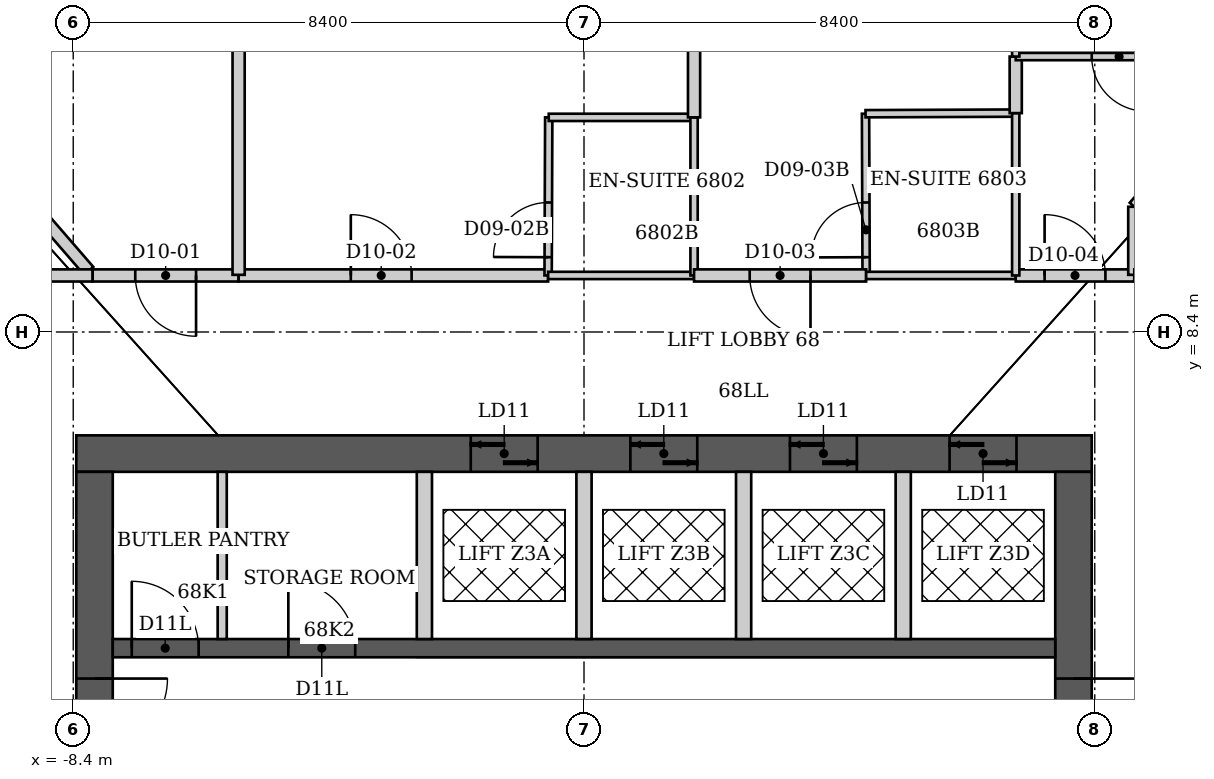
"""IFC4 building model, lengths in metres.
Left out: names, types, materials, properties, quantities, classifications, styles, units other than length and angle.
Written with IfcOpenShell. Run it as: python <this file> out.ifc"""

import sys

from ifc_helpers import new_model, si_unit, direction, frame, frame_2d, origin, place, context, subcontext, project, spatial, rectangle, extrude, element, fill, save


model = new_model("IFC4")
c1 = context("Model", 3, precision=1e-05, world=origin(), true_north=direction((0.0, 1.0)))
c2 = subcontext(c1, "Body", "Model", "MODEL_VIEW")
j1 = project(units=[si_unit("LENGTHUNIT", "METRE"), si_unit("PLANEANGLEUNIT", "RADIAN")], contexts=[c1])
p1 = place(None, origin())
s1 = spatial("IfcSite", under=j1, at=p1, CompositionType="ELEMENT")
p2 = place(p1, origin())
s2 = spatial("IfcBuilding", under=s1, at=p2, CompositionType="ELEMENT")
p3 = place(p2, frame((0.0, 0.0, 272.2)))
s3 = spatial("IfcBuildingStorey", under=s2, at=p3, CompositionType="ELEMENT", Elevation=272.2)
p4 = place(p3, frame((-8.35, 6.4, 0.0), z_axis=(0.0, 0.0, 1.0), x_axis=(1.0, 0.0, 0.0)))
e1 = element("IfcWall", 1, at=p4, inside=s3, PredefinedType="SHEAR", context=c2, shape_type="SweptSolid", body=[
    extrude(rectangle(XDim=16.7, YDim=0.6, at=frame_2d((8.35, 0.0))), origin(), (0.0, 0.0, 1.0), 3.8),
])
p5 = place(p4, frame((6.488, 0.0, 0.0)))
e2 = element("IfcOpeningElement", 2, at=p5, cuts=e1, PredefinedType="OPENING", context=c2, shape_type="SweptSolid", body=[
    extrude(rectangle(XDim=1.1, YDim=2.1, at=frame_2d((0.55, 1.05))), frame((0.0, 0.3, 0.0), z_axis=(0.0, -1.0, 0.0), x_axis=(1.0, 0.0, 0.0)), (0.0, 0.0, 1.0), 0.6),
])
p6 = place(p4, frame((9.113, 0.0, 0.0)))
e3 = element("IfcOpeningElement", 3, at=p6, cuts=e1, PredefinedType="OPENING", context=c2, shape_type="SweptSolid", body=[
    extrude(rectangle(XDim=1.1, YDim=2.1, at=frame_2d((0.55, 1.05))), frame((0.0, 0.3, 0.0), z_axis=(0.0, -1.0, 0.0), x_axis=(1.0, 0.0, 0.0)), (0.0, 0.0, 1.0), 0.6),
])
p7 = place(p4, frame((11.738, 0.0, 0.0)))
e4 = element("IfcOpeningElement", 4, at=p7, cuts=e1, PredefinedType="OPENING", context=c2, shape_type="SweptSolid", body=[
    extrude(rectangle(XDim=1.1, YDim=2.1, at=frame_2d((0.55, 1.05))), frame((0.0, 0.3, 0.0), z_axis=(0.0, -1.0, 0.0), x_axis=(1.0, 0.0, 0.0)), (0.0, 0.0, 1.0), 0.6),
])
p8 = place(p4, frame((14.363, 0.0, 0.0)))
e5 = element("IfcOpeningElement", 5, at=p8, cuts=e1, PredefinedType="OPENING", context=c2, shape_type="SweptSolid", body=[
    extrude(rectangle(XDim=1.1, YDim=2.1, at=frame_2d((0.55, 1.05))), frame((0.0, 0.3, 0.0), z_axis=(0.0, -1.0, 0.0), x_axis=(1.0, 0.0, 0.0)), (0.0, 0.0, 1.0), 0.6),
])
p9 = place(p3, frame((-8.05, -6.1, 0.0), z_axis=(0.0, 0.0, 1.0), x_axis=(0.0, 1.0, 0.0)))
e6 = element("IfcWall", 6, at=p9, inside=s3, PredefinedType="SHEAR", context=c2, shape_type="SweptSolid", body=[
    extrude(rectangle(XDim=12.2, YDim=0.6, at=frame_2d((6.1, 0.0))), origin(), (0.0, 0.0, 1.0), 3.8),
])
p10 = place(p9, frame((7.6, 0.0, 0.0)))
e7 = element("IfcOpeningElement", 7, at=p10, cuts=e6, PredefinedType="OPENING", context=c2, shape_type="SweptSolid", body=[
    extrude(rectangle(XDim=1.2, YDim=2.2, at=frame_2d((0.6, 1.1))), frame((0.0, 0.3, 0.0), z_axis=(0.0, -1.0, 0.0), x_axis=(1.0, 0.0, 0.0)), (0.0, 0.0, 1.0), 0.6),
])
p11 = place(p3, frame((8.05, -6.1, 0.0), z_axis=(0.0, 0.0, 1.0), x_axis=(0.0, 1.0, 0.0)))
e8 = element("IfcWall", 8, at=p11, inside=s3, PredefinedType="SHEAR", context=c2, shape_type="SweptSolid", body=[
    extrude(rectangle(XDim=12.2, YDim=0.6, at=frame_2d((6.1, 0.0))), origin(), (0.0, 0.0, 1.0), 3.8),
])
p12 = place(p11, frame((7.6, 0.0, 0.0)))
e9 = element("IfcOpeningElement", 9, at=p12, cuts=e8, PredefinedType="OPENING", context=c2, shape_type="SweptSolid", body=[
    extrude(rectangle(XDim=1.2, YDim=2.2, at=frame_2d((0.6, 1.1))), frame((0.0, 0.3, 0.0), z_axis=(0.0, -1.0, 0.0), x_axis=(1.0, 0.0, 0.0)), (0.0, 0.0, 1.0), 0.6),
])
p13 = place(p3, frame((-7.75, 3.2, 0.0), z_axis=(0.0, 0.0, 1.0), x_axis=(1.0, 0.0, 0.0)))
e10 = element("IfcWall", 10, at=p13, inside=s3, PredefinedType="SHEAR", context=c2, shape_type="SweptSolid", body=[
    extrude(rectangle(XDim=15.5, YDim=0.3, at=frame_2d((7.75, 0.0))), origin(), (0.0, 0.0, 1.0), 3.8),
])
p14 = place(p13, frame((0.312, 0.0, 0.0)))
e11 = element("IfcOpeningElement", 11, at=p14, cuts=e10, PredefinedType="OPENING", context=c2, shape_type="SweptSolid", body=[
    extrude(rectangle(XDim=1.1, YDim=2.2, at=frame_2d((0.55, 1.1))), frame((0.0, 0.15, 0.0), z_axis=(0.0, -1.0, 0.0), x_axis=(1.0, 0.0, 0.0)), (0.0, 0.0, 1.0), 0.3),
])
p15 = place(p13, frame((2.887, 0.0, 0.0)))
e12 = element("IfcOpeningElement", 12, at=p15, cuts=e10, PredefinedType="OPENING", context=c2, shape_type="SweptSolid", body=[
    extrude(rectangle(XDim=1.1, YDim=2.2, at=frame_2d((0.55, 1.1))), frame((0.0, 0.15, 0.0), z_axis=(0.0, -1.0, 0.0), x_axis=(1.0, 0.0, 0.0)), (0.0, 0.0, 1.0), 0.3),
])
for number, where, z_axis, x_axis in (
    (13, (-2.625, 3.35, 0.0), (0.0, 0.0, 1.0), (0.0, 1.0, 0.0)),
    (14, (0.0, 3.35, 0.0), (0.0, 0.0, 1.0), (0.0, 1.0, 0.0)),
    (15, (2.625, 3.35, 0.0), (0.0, 0.0, 1.0), (0.0, 1.0, 0.0)),
    (16, (5.25, 3.35, 0.0), (0.0, 0.0, 1.0), (0.0, 1.0, 0.0)),
):
    element("IfcWall", number, at=place(p3, frame(where, z_axis=z_axis, x_axis=x_axis)), inside=s3, PredefinedType="PARTITIONING", context=c2, shape_type="SweptSolid", body=[
        extrude(rectangle(XDim=2.75, YDim=0.25, at=frame_2d((1.375, 0.0))), origin(), (0.0, 0.0, 1.0), 3.8),
    ])
p16 = place(p3, frame((-8.146, 9.406, 0.0), z_axis=(0.0, 0.0, 1.0), x_axis=(-0.654501911032, 0.756060347099, 0.0)))
e17 = element("IfcWall", 17, at=p16, inside=s3, PredefinedType="PARTITIONING", context=c2, shape_type="SweptSolid", body=[
    extrude(rectangle(XDim=13.361, YDim=0.2, at=frame_2d((6.681, 0.0))), origin(), (0.0, 0.0, 1.0), 3.64),
])
p17 = place(p3, frame((-8.08, 9.33, 0.0), z_axis=(0.0, 0.0, 1.0), x_axis=(-1.0, 0.0, 0.0)))
e18 = element("IfcWall", 18, at=p17, inside=s3, PredefinedType="PARTITIONING", context=c2, shape_type="SweptSolid", body=[
    extrude(rectangle(XDim=1.96, YDim=0.2, at=frame_2d((0.98, 0.0))), origin(), (0.0, 0.0, 1.0), 3.64),
])
p18 = place(p3, frame((-5.68, 9.33, 0.0), z_axis=(0.0, 0.0, 1.0), x_axis=(-1.0, 0.0, 0.0)))
e19 = element("IfcWall", 19, at=p18, inside=s3, PredefinedType="PARTITIONING", context=c2, shape_type="SweptSolid", body=[
    extrude(rectangle(XDim=2.4, YDim=0.2, at=frame_2d((1.2, 0.0))), origin(), (0.0, 0.0, 1.0), 3.64),
])
p19 = place(p18, frame((0.7, 0.0, 0.0)))
e20 = element("IfcOpeningElement", 20, at=p19, cuts=e19, PredefinedType="OPENING", context=c2, shape_type="SweptSolid", body=[
    extrude(rectangle(XDim=1.0, YDim=2.13, at=frame_2d((0.5, 1.065))), frame((0.0, 0.1, 0.0), z_axis=(0.0, -1.0, 0.0), x_axis=(1.0, 0.0, 0.0)), (0.0, 0.0, 1.0), 0.2),
])
p20 = place(p3, frame((-5.68, 9.33, 0.0), z_axis=(0.0, 0.0, 1.0), x_axis=(1.0, 0.0, 0.0)))
e21 = element("IfcWall", 21, at=p20, inside=s3, PredefinedType="PARTITIONING", context=c2, shape_type="SweptSolid", body=[
    extrude(rectangle(XDim=5.09, YDim=0.2, at=frame_2d((2.545, 0.0))), origin(), (0.0, 0.0, 1.0), 3.64),
])
p21 = place(p20, frame((1.845, 0.0, 0.0)))
e22 = element("IfcOpeningElement", 22, at=p21, cuts=e21, PredefinedType="OPENING", context=c2, shape_type="SweptSolid", body=[
    extrude(rectangle(XDim=1.0, YDim=2.13, at=frame_2d((0.5, 1.065))), frame((0.0, 0.1, 0.0), z_axis=(0.0, -1.0, 0.0), x_axis=(1.0, 0.0, 0.0)), (0.0, 0.0, 1.0), 0.2),
])
p22 = place(p3, frame((-5.68, 14.58, 0.0), z_axis=(0.0, 0.0, 1.0), x_axis=(0.0, -1.0, 0.0)))
e23 = element("IfcWall", 23, at=p22, inside=s3, PredefinedType="PARTITIONING", context=c2, shape_type="SweptSolid", body=[
    extrude(rectangle(XDim=5.24, YDim=0.2, at=frame_2d((2.62, 0.0))), origin(), (0.0, 0.0, 1.0), 3.64),
])
p23 = place(p3, frame((-0.58, 11.93, 0.0), z_axis=(0.0, 0.0, 1.0), x_axis=(-0.003850098237, -0.999992588344, 0.0)))
e24 = element("IfcWall", 24, at=p23, inside=s3, PredefinedType="PARTITIONING", context=c2, shape_type="SweptSolid", body=[
    extrude(rectangle(XDim=2.6, YDim=0.12, at=frame_2d((1.3, 0.0))), origin(), (0.0, 0.0, 1.0), 3.64),
])
p24 = place(p23, frame((1.4, 0.0, 0.0)))
e25 = element("IfcOpeningElement", 25, at=p24, cuts=e24, PredefinedType="OPENING", context=c2, shape_type="SweptSolid", body=[
    extrude(rectangle(XDim=0.9, YDim=2.03, at=frame_2d((0.45, 1.015))), frame((0.0, 0.06, 0.0), z_axis=(0.0, -1.0, 0.0), x_axis=(1.0, 0.0, 0.0)), (0.0, 0.0, 1.0), 0.12),
])
p25 = place(p3, frame((1.81, 9.33, 0.0), z_axis=(0.0, 0.0, 1.0), x_axis=(-1.0, 0.0, 0.0)))
e26 = element("IfcWall", 26, at=p25, inside=s3, PredefinedType="PARTITIONING", context=c2, shape_type="SweptSolid", body=[
    extrude(rectangle(XDim=2.4, YDim=0.12, at=frame_2d((1.2, 0.0))), origin(), (0.0, 0.0, 1.0), 3.64),
])
p26 = place(p3, frame((1.81, 11.93, 0.0), z_axis=(0.0, 0.0, 1.0), x_axis=(-1.0, 0.0, 0.0)))
e27 = element("IfcWall", 27, at=p26, inside=s3, PredefinedType="PARTITIONING", context=c2, shape_type="SweptSolid", body=[
    extrude(rectangle(XDim=2.39, YDim=0.12, at=frame_2d((1.195, 0.0))), origin(), (0.0, 0.0, 1.0), 3.64),
])
p27 = place(p3, frame((1.81, 11.93, 0.0), z_axis=(0.0, 0.0, 1.0), x_axis=(0.0, -1.0, 0.0)))
e28 = element("IfcWall", 28, at=p27, inside=s3, PredefinedType="PARTITIONING", context=c2, shape_type="SweptSolid", body=[
    extrude(rectangle(XDim=2.6, YDim=0.12, at=frame_2d((1.3, 0.0))), origin(), (0.0, 0.0, 1.0), 3.023),
])
p28 = place(p3, frame((1.81, 19.71, 0.0), z_axis=(0.0, 0.0, 1.0), x_axis=(0.0, -1.0, 0.0)))
e29 = element("IfcWall", 29, at=p28, inside=s3, PredefinedType="PARTITIONING", context=c2, shape_type="SweptSolid", body=[
    extrude(rectangle(XDim=7.78, YDim=0.2, at=frame_2d((3.89, 0.0))), origin(), (0.0, 0.0, 1.0), 3.023),
])
p29 = place(p3, frame((4.63, 11.99, 0.0), z_axis=(0.0, 0.0, 1.0), x_axis=(0.00376316748, -0.99999291926, 0.0)))
e30 = element("IfcWall", 30, at=p29, inside=s3, PredefinedType="PARTITIONING", context=c2, shape_type="SweptSolid", body=[
    extrude(rectangle(XDim=2.66, YDim=0.12, at=frame_2d((1.33, 0.0))), origin(), (0.0, 0.0, 1.0), 3.64),
])
p30 = place(p29, frame((1.46, 0.0, 0.0)))
e31 = element("IfcOpeningElement", 31, at=p30, cuts=e30, PredefinedType="OPENING", context=c2, shape_type="SweptSolid", body=[
    extrude(rectangle(XDim=0.9, YDim=2.03, at=frame_2d((0.45, 1.015))), frame((0.0, 0.06, 0.0), z_axis=(0.0, -1.0, 0.0), x_axis=(1.0, 0.0, 0.0)), (0.0, 0.0, 1.0), 0.12),
])
p31 = place(p3, frame((4.64, 9.33, 0.0), z_axis=(0.0, 0.0, 1.0), x_axis=(-1.0, 0.0, 0.0)))
e32 = element("IfcWall", 32, at=p31, inside=s3, PredefinedType="PARTITIONING", context=c2, shape_type="SweptSolid", body=[
    extrude(rectangle(XDim=2.83, YDim=0.2, at=frame_2d((1.415, 0.0))), origin(), (0.0, 0.0, 1.0), 3.64),
])
p32 = place(p31, frame((0.915, 0.0, 0.0)))
e33 = element("IfcOpeningElement", 33, at=p32, cuts=e32, PredefinedType="OPENING", context=c2, shape_type="SweptSolid", body=[
    extrude(rectangle(XDim=1.0, YDim=2.13, at=frame_2d((0.5, 1.065))), frame((0.0, 0.1, 0.0), z_axis=(0.0, -1.0, 0.0), x_axis=(1.0, 0.0, 0.0)), (0.0, 0.0, 1.0), 0.2),
])
p33 = place(p3, frame((7.1, 9.33, 0.0), z_axis=(0.0, 0.0, 1.0), x_axis=(-1.0, 0.0, 0.0)))
e34 = element("IfcWall", 34, at=p33, inside=s3, PredefinedType="PARTITIONING", context=c2, shape_type="SweptSolid", body=[
    extrude(rectangle(XDim=2.46, YDim=0.12, at=frame_2d((1.23, 0.0))), origin(), (0.0, 0.0, 1.0), 3.64),
])
p34 = place(p3, frame((7.1, 9.33, 0.0), z_axis=(0.0, 0.0, 1.0), x_axis=(1.0, 0.0, 0.0)))
e35 = element("IfcWall", 35, at=p34, inside=s3, PredefinedType="PARTITIONING", context=c2, shape_type="SweptSolid", body=[
    extrude(rectangle(XDim=1.95, YDim=0.2, at=frame_2d((0.975, 0.0))), origin(), (0.0, 0.0, 1.0), 3.64),
])
p35 = place(p34, frame((0.475, 0.0, 0.0)))
e36 = element("IfcOpeningElement", 36, at=p35, cuts=e35, PredefinedType="OPENING", context=c2, shape_type="SweptSolid", body=[
    extrude(rectangle(XDim=1.0, YDim=2.13, at=frame_2d((0.5, 1.065))), frame((0.0, 0.1, 0.0), z_axis=(0.0, -1.0, 0.0), x_axis=(1.0, 0.0, 0.0)), (0.0, 0.0, 1.0), 0.2),
])
p36 = place(p3, frame((7.1, 12.0, 0.0), z_axis=(0.0, 0.0, 1.0), x_axis=(-0.99999178838, -0.00405255148, 0.0)))
e37 = element("IfcWall", 37, at=p36, inside=s3, PredefinedType="PARTITIONING", context=c2, shape_type="SweptSolid", body=[
    extrude(rectangle(XDim=2.47, YDim=0.12, at=frame_2d((1.235, 0.0))), origin(), (0.0, 0.0, 1.0), 3.64),
])
p37 = place(p3, frame((7.1, 12.0, 0.0), z_axis=(0.0, 0.0, 1.0), x_axis=(0.0, -1.0, 0.0)))
e38 = element("IfcWall", 38, at=p37, inside=s3, PredefinedType="PARTITIONING", context=c2, shape_type="SweptSolid", body=[
    extrude(rectangle(XDim=2.67, YDim=0.12, at=frame_2d((1.335, 0.0))), origin(), (0.0, 0.0, 1.0), 3.64),
])
p38 = place(p3, frame((7.1, 12.93, 0.0), z_axis=(0.0, 0.0, 1.0), x_axis=(0.0, -1.0, 0.0)))
e39 = element("IfcWall", 39, at=p38, inside=s3, PredefinedType="PARTITIONING", context=c2, shape_type="SweptSolid", body=[
    extrude(rectangle(XDim=0.93, YDim=0.2, at=frame_2d((0.465, 0.0))), origin(), (0.0, 0.0, 1.0), 3.64),
])
p39 = place(p3, frame((7.1, 12.93, 0.0), z_axis=(0.0, 0.0, 1.0), x_axis=(1.0, 0.0, 0.0)))
e40 = element("IfcWall", 40, at=p39, inside=s3, PredefinedType="PARTITIONING", context=c2, shape_type="SweptSolid", body=[
    extrude(rectangle(XDim=2.6, YDim=0.12, at=frame_2d((1.3, 0.0))), origin(), (0.0, 0.0, 1.0), 3.64),
])
p40 = place(p39, frame((1.25, 0.0, 0.0)))
e41 = element("IfcOpeningElement", 41, at=p40, cuts=e40, PredefinedType="OPENING", context=c2, shape_type="SweptSolid", body=[
    extrude(rectangle(XDim=0.9, YDim=2.03, at=frame_2d((0.45, 1.015))), frame((0.0, 0.06, 0.0), z_axis=(0.0, -1.0, 0.0), x_axis=(1.0, 0.0, 0.0)), (0.0, 0.0, 1.0), 0.12),
])
p41 = place(p3, frame((7.1, 15.33, 0.0), z_axis=(0.0, 0.0, 1.0), x_axis=(0.0, -1.0, 0.0)))
e42 = element("IfcWall", 42, at=p41, inside=s3, PredefinedType="PARTITIONING", context=c2, shape_type="SweptSolid", body=[
    extrude(rectangle(XDim=2.4, YDim=0.12, at=frame_2d((1.2, 0.0))), origin(), (0.0, 0.0, 1.0), 3.64),
])
p42 = place(p3, frame((9.05, 10.46, 0.0), z_axis=(0.0, 0.0, 1.0), x_axis=(0.0, -1.0, 0.0)))
e43 = element("IfcWall", 43, at=p42, inside=s3, PredefinedType="PARTITIONING", context=c2, shape_type="SweptSolid", body=[
    extrude(rectangle(XDim=1.12, YDim=0.2, at=frame_2d((0.56, 0.0))), origin(), (0.0, 0.0, 1.0), 3.64),
])
p43 = place(p3, frame((9.05, 10.46, 0.0), z_axis=(0.0, 0.0, 1.0), x_axis=(0.656083941969, 0.754687922979, 0.0)))
e44 = element("IfcWall", 44, at=p43, inside=s3, PredefinedType="PARTITIONING", context=c2, shape_type="SweptSolid", body=[
    extrude(rectangle(XDim=1.594, YDim=0.2, at=frame_2d((0.797, 0.0))), origin(), (0.0, 0.0, 1.0), 3.64),
])
p44 = place(p3, frame((-5.95, 3.35, 0.0), z_axis=(0.0, 0.0, 1.0), x_axis=(0.0, 1.0, 0.0)))
e45 = element("IfcWall", 45, at=p44, inside=s3, PredefinedType="PARTITIONING", context=c2, shape_type="SweptSolid", body=[
    extrude(rectangle(XDim=2.75, YDim=0.15, at=frame_2d((1.375, 0.0))), origin(), (0.0, 0.0, 1.0), 3.64),
])
p45 = place(p19, origin())
e46 = element("IfcDoor", 46, at=p45, inside=s3, OperationType="SINGLE_SWING_LEFT", PredefinedType="DOOR", context=c2, shape_type="SweptSolid", body=[
    extrude(rectangle(XDim=1.0, YDim=2.13, at=frame_2d((0.5, 1.065))), frame((0.0, 0.025, 0.0), z_axis=(0.0, -1.0, 0.0), x_axis=(1.0, 0.0, 0.0)), (0.0, 0.0, 1.0), 0.05),
])
fill(e20, e46)
p46 = place(p21, origin())
e47 = element("IfcDoor", 47, at=p46, inside=s3, OperationType="SINGLE_SWING_LEFT", PredefinedType="DOOR", context=c2, shape_type="SweptSolid", body=[
    extrude(rectangle(XDim=1.0, YDim=2.13, at=frame_2d((0.5, 1.065))), frame((0.0, 0.025, 0.0), z_axis=(0.0, -1.0, 0.0), x_axis=(1.0, 0.0, 0.0)), (0.0, 0.0, 1.0), 0.05),
])
fill(e22, e47)
p47 = place(p24, origin())
e48 = element("IfcDoor", 48, at=p47, inside=s3, OperationType="SINGLE_SWING_RIGHT", PredefinedType="DOOR", context=c2, shape_type="SweptSolid", body=[
    extrude(rectangle(XDim=0.9, YDim=2.03, at=frame_2d((0.45, 1.015))), frame((0.0, 0.025, 0.0), z_axis=(0.0, -1.0, 0.0), x_axis=(1.0, 0.0, 0.0)), (0.0, 0.0, 1.0), 0.05),
])
fill(e25, e48)
p48 = place(p32, origin())
e49 = element("IfcDoor", 49, at=p48, inside=s3, OperationType="SINGLE_SWING_LEFT", PredefinedType="DOOR", context=c2, shape_type="SweptSolid", body=[
    extrude(rectangle(XDim=1.0, YDim=2.13, at=frame_2d((0.5, 1.065))), frame((0.0, 0.025, 0.0), z_axis=(0.0, -1.0, 0.0), x_axis=(1.0, 0.0, 0.0)), (0.0, 0.0, 1.0), 0.05),
])
fill(e33, e49)
p49 = place(p30, origin())
e50 = element("IfcDoor", 50, at=p49, inside=s3, OperationType="SINGLE_SWING_RIGHT", PredefinedType="DOOR", context=c2, shape_type="SweptSolid", body=[
    extrude(rectangle(XDim=0.9, YDim=2.03, at=frame_2d((0.45, 1.015))), frame((0.0, 0.025, 0.0), z_axis=(0.0, -1.0, 0.0), x_axis=(1.0, 0.0, 0.0)), (0.0, 0.0, 1.0), 0.05),
])
fill(e31, e50)
p50 = place(p35, origin())
e51 = element("IfcDoor", 51, at=p50, inside=s3, OperationType="SINGLE_SWING_LEFT", PredefinedType="DOOR", context=c2, shape_type="SweptSolid", body=[
    extrude(rectangle(XDim=1.0, YDim=2.13, at=frame_2d((0.5, 1.065))), frame((0.0, 0.025, 0.0), z_axis=(0.0, -1.0, 0.0), x_axis=(1.0, 0.0, 0.0)), (0.0, 0.0, 1.0), 0.05),
])
fill(e36, e51)
p51 = place(p40, origin())
e52 = element("IfcDoor", 52, at=p51, inside=s3, OperationType="SINGLE_SWING_RIGHT", PredefinedType="DOOR", context=c2, shape_type="SweptSolid", body=[
    extrude(rectangle(XDim=0.9, YDim=2.03, at=frame_2d((0.45, 1.015))), frame((0.0, 0.025, 0.0), z_axis=(0.0, -1.0, 0.0), x_axis=(1.0, 0.0, 0.0)), (0.0, 0.0, 1.0), 0.05),
])
fill(e41, e52)
p52 = place(p10, origin())
e53 = element("IfcDoor", 53, at=p52, inside=s3, OperationType="SINGLE_SWING_RIGHT", PredefinedType="DOOR", context=c2, shape_type="SweptSolid", body=[
    extrude(rectangle(XDim=1.2, YDim=2.2, at=frame_2d((0.6, 1.1))), frame((0.0, 0.025, 0.0), z_axis=(0.0, -1.0, 0.0), x_axis=(1.0, 0.0, 0.0)), (0.0, 0.0, 1.0), 0.05),
])
fill(e7, e53)
p53 = place(p12, origin())
e54 = element("IfcDoor", 54, at=p53, inside=s3, OperationType="SINGLE_SWING_RIGHT", PredefinedType="DOOR", context=c2, shape_type="SweptSolid", body=[
    extrude(rectangle(XDim=1.2, YDim=2.2, at=frame_2d((0.6, 1.1))), frame((0.0, 0.025, 0.0), z_axis=(0.0, -1.0, 0.0), x_axis=(1.0, 0.0, 0.0)), (0.0, 0.0, 1.0), 0.05),
])
fill(e9, e54)
p54 = place(p14, origin())
e55 = element("IfcDoor", 55, at=p54, inside=s3, OperationType="SINGLE_SWING_LEFT", PredefinedType="DOOR", context=c2, shape_type="SweptSolid", body=[
    extrude(rectangle(XDim=1.1, YDim=2.2, at=frame_2d((0.55, 1.1))), frame((0.0, 0.025, 0.0), z_axis=(0.0, -1.0, 0.0), x_axis=(1.0, 0.0, 0.0)), (0.0, 0.0, 1.0), 0.05),
])
fill(e11, e55)
p55 = place(p15, origin())
e56 = element("IfcDoor", 56, at=p55, inside=s3, OperationType="SINGLE_SWING_LEFT", PredefinedType="DOOR", context=c2, shape_type="SweptSolid", body=[
    extrude(rectangle(XDim=1.1, YDim=2.2, at=frame_2d((0.55, 1.1))), frame((0.0, 0.025, 0.0), z_axis=(0.0, -1.0, 0.0), x_axis=(1.0, 0.0, 0.0)), (0.0, 0.0, 1.0), 0.05),
])
fill(e12, e56)
p56 = place(p5, origin())
e57 = element("IfcDoor", 57, at=p56, inside=s3, OperationType="DOUBLE_DOOR_SLIDING", PredefinedType="DOOR", context=c2, shape_type="SweptSolid", body=[
    extrude(rectangle(XDim=1.1, YDim=2.1, at=frame_2d((0.55, 1.05))), frame((0.0, 0.025, 0.0), z_axis=(0.0, -1.0, 0.0), x_axis=(1.0, 0.0, 0.0)), (0.0, 0.0, 1.0), 0.05),
])
fill(e2, e57)
p57 = place(p6, origin())
e58 = element("IfcDoor", 58, at=p57, inside=s3, OperationType="DOUBLE_DOOR_SLIDING", PredefinedType="DOOR", context=c2, shape_type="SweptSolid", body=[
    extrude(rectangle(XDim=1.1, YDim=2.1, at=frame_2d((0.55, 1.05))), frame((0.0, 0.025, 0.0), z_axis=(0.0, -1.0, 0.0), x_axis=(1.0, 0.0, 0.0)), (0.0, 0.0, 1.0), 0.05),
])
fill(e3, e58)
p58 = place(p7, origin())
e59 = element("IfcDoor", 59, at=p58, inside=s3, OperationType="DOUBLE_DOOR_SLIDING", PredefinedType="DOOR", context=c2, shape_type="SweptSolid", body=[
    extrude(rectangle(XDim=1.1, YDim=2.1, at=frame_2d((0.55, 1.05))), frame((0.0, 0.025, 0.0), z_axis=(0.0, -1.0, 0.0), x_axis=(1.0, 0.0, 0.0)), (0.0, 0.0, 1.0), 0.05),
])
fill(e4, e59)
p59 = place(p8, origin())
e60 = element("IfcDoor", 60, at=p59, inside=s3, OperationType="DOUBLE_DOOR_SLIDING", PredefinedType="DOOR", context=c2, shape_type="SweptSolid", body=[
    extrude(rectangle(XDim=1.1, YDim=2.1, at=frame_2d((0.55, 1.05))), frame((0.0, 0.025, 0.0), z_axis=(0.0, -1.0, 0.0), x_axis=(1.0, 0.0, 0.0)), (0.0, 0.0, 1.0), 0.05),
])
fill(e5, e60)
save(model, sys.argv[1])
